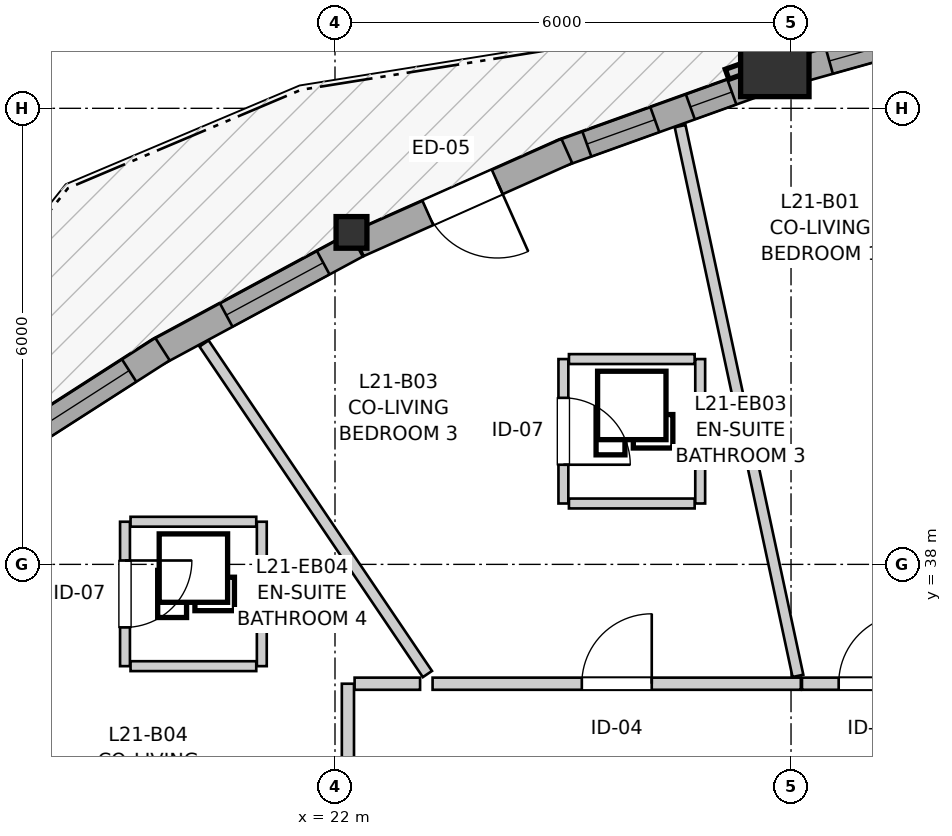
"""IFC4 building model, lengths in metres.
Left out: names, types, materials, properties, quantities, classifications, styles, units other than length and angle.
Written with IfcOpenShell. Run it as: python <this file> out.ifc"""

import sys

from ifc_helpers import new_model, si_unit, direction, frame, frame_2d, origin, origin_2d, place, context, subcontext, project, spatial, rectangle, i_section, extrude, source, transform, mapped, element, fill, save


model = new_model("IFC4")
c1 = context("Model", 3, precision=1e-05, world=origin(), true_north=direction((0.0, 1.0)))
c2 = subcontext(c1, "Body", "Model", "MODEL_VIEW")
j1 = project(units=[si_unit("LENGTHUNIT", "METRE"), si_unit("PLANEANGLEUNIT", "RADIAN")], contexts=[c1])
p1 = place(None, origin())
s1 = spatial("IfcSite", under=j1, at=p1, CompositionType="ELEMENT")
p2 = place(p1, origin())
s2 = spatial("IfcBuilding", under=s1, at=p2, CompositionType="ELEMENT")
p3 = place(p2, frame((0.0, 0.0, 73.6)))
s3 = spatial("IfcBuildingStorey", under=s2, at=p3, CompositionType="ELEMENT", Elevation=73.6)
m1 = source(origin(), c2, "Body", "SweptSolid", [
    extrude(rectangle(XDim=0.9, YDim=0.9, at=origin_2d()), origin(), (0.0, 0.0, 1.0), 2.95),
])
p4 = place(p3, frame((27.787, 44.604, 0.0), z_axis=(0.0, 0.0, 1.0), x_axis=(1.0, 0.0, 0.0)))
e1 = element("IfcColumn", 1, at=p4, inside=s3, PredefinedType="COLUMN", context=c2, shape_type="MappedRepresentation", body=[
    mapped(m1, transform((0.0, 0.0, 0.0), x_axis=(1.0, 0.0, 0.0), y_axis=(0.0, 1.0, 0.0), z_axis=(0.0, 0.0, 1.0), scale=1.0)),
])
m2 = source(origin(), c2, "Body", "SweptSolid", [
    extrude(i_section(OverallWidth=0.406, OverallDepth=0.416, WebThickness=0.027, FlangeThickness=0.044, FilletRadius=0.015, at=origin_2d()), origin(), (0.0, 0.0, 1.0), 2.95),
])
p5 = place(p3, frame((22.217, 42.367, 0.0), z_axis=(0.0, 0.0, 1.0), x_axis=(1.0, 0.0, 0.0)))
e2 = element("IfcColumn", 2, at=p5, inside=s3, PredefinedType="PILASTER", context=c2, shape_type="MappedRepresentation", body=[
    mapped(m2, transform((0.0, 0.0, 0.0), x_axis=(1.0, 0.0, 0.0), y_axis=(0.0, 1.0, 0.0), z_axis=(0.0, 0.0, 1.0), scale=1.0)),
])
p6 = place(p3, frame((30.827, 45.272, 0.0), z_axis=(0.0, 0.0, 1.0), x_axis=(-0.963061576901, -0.269281263918, 0.0)))
e3 = element("IfcWall", 3, at=p6, inside=s3, PredefinedType="SOLIDWALL", context=c2, shape_type="SweptSolid", body=[
    extrude(rectangle(XDim=2.883, YDim=0.35, at=frame_2d((1.441, 0.0))), origin(), (0.0, 0.0, 1.0), 2.48),
])
p7 = place(p6, frame((1.163, 0.0, 0.82)))
e4 = element("IfcOpeningElement", 4, at=p7, cuts=e3, PredefinedType="OPENING", context=c2, shape_type="SweptSolid", body=[
    extrude(rectangle(XDim=1.25, YDim=1.35, at=frame_2d((0.625, 0.675))), frame((0.0, 0.185, 0.0), z_axis=(0.0, -1.0, 0.0), x_axis=(1.0, 0.0, 0.0)), (0.0, 0.0, 1.0), 0.37),
])
p8 = place(p3, frame((27.634, 44.363, 0.0), z_axis=(0.0, 0.0, 1.0), x_axis=(-0.941122275829, -0.3380663573, 0.0)))
e5 = element("IfcWall", 5, at=p8, inside=s3, PredefinedType="SOLIDWALL", context=c2, shape_type="SweptSolid", body=[
    extrude(rectangle(XDim=2.833, YDim=0.35, at=frame_2d((1.417, 0.0))), origin(), (0.0, 0.0, 1.0), 2.48),
])
p9 = place(p8, frame((0.439, 0.0, 0.82)))
e6 = element("IfcOpeningElement", 6, at=p9, cuts=e5, PredefinedType="OPENING", context=c2, shape_type="SweptSolid", body=[
    extrude(rectangle(XDim=0.58, YDim=1.35, at=frame_2d((0.29, 0.675))), frame((0.0, 0.185, 0.0), z_axis=(0.0, -1.0, 0.0), x_axis=(1.0, 0.0, 0.0)), (0.0, 0.0, 1.0), 0.37),
])
p10 = place(p8, frame((1.515, 0.0, 0.82)))
e7 = element("IfcOpeningElement", 7, at=p10, cuts=e5, PredefinedType="OPENING", context=c2, shape_type="SweptSolid", body=[
    extrude(rectangle(XDim=0.95, YDim=1.35, at=frame_2d((0.475, 0.675))), frame((0.0, 0.185, 0.0), z_axis=(0.0, -1.0, 0.0), x_axis=(1.0, 0.0, 0.0)), (0.0, 0.0, 1.0), 0.37),
])
p11 = place(p3, frame((25.051, 43.438, 0.0), z_axis=(0.0, 0.0, 1.0), x_axis=(-0.913435824308, -0.406982794318, 0.0)))
e8 = element("IfcWall", 8, at=p11, inside=s3, PredefinedType="SOLIDWALL", context=c2, shape_type="SweptSolid", body=[
    extrude(rectangle(XDim=3.004, YDim=0.35, at=frame_2d((1.502, 0.0))), origin(), (0.0, 0.0, 1.0), 2.48),
])
p12 = place(p11, frame((1.002, 0.0, 0.0)))
e9 = element("IfcOpeningElement", 9, at=p12, cuts=e8, PredefinedType="OPENING", context=c2, shape_type="SweptSolid", body=[
    extrude(rectangle(XDim=1.0, YDim=2.1, at=frame_2d((0.5, 1.05))), frame((0.0, 0.185, 0.0), z_axis=(0.0, -1.0, 0.0), x_axis=(1.0, 0.0, 0.0)), (0.0, 0.0, 1.0), 0.37),
])
p13 = place(p3, frame((22.282, 42.204, 0.0), z_axis=(0.0, 0.0, 1.0), x_axis=(-0.880100783756, -0.474786910553, 0.0)))
e10 = element("IfcWall", 10, at=p13, inside=s3, PredefinedType="SOLIDWALL", context=c2, shape_type="SweptSolid", body=[
    extrude(rectangle(XDim=2.987, YDim=0.35, at=frame_2d((1.494, 0.0))), origin(), (0.0, 0.0, 1.0), 2.48),
])
p14 = place(p13, frame((0.497, 0.0, 0.82)))
e11 = element("IfcOpeningElement", 11, at=p14, cuts=e10, PredefinedType="OPENING", context=c2, shape_type="SweptSolid", body=[
    extrude(rectangle(XDim=1.45, YDim=1.25, at=frame_2d((0.725, 0.625))), frame((0.0, 0.185, 0.0), z_axis=(0.0, -1.0, 0.0), x_axis=(1.0, 0.0, 0.0)), (0.0, 0.0, 1.0), 0.37),
])
p15 = place(p3, frame((19.73, 40.831, 0.0), z_axis=(0.0, 0.0, 1.0), x_axis=(-0.841577423868, -0.540136500929, 0.0)))
e12 = element("IfcWall", 12, at=p15, inside=s3, PredefinedType="SOLIDWALL", context=c2, shape_type="SweptSolid", body=[
    extrude(rectangle(XDim=2.782, YDim=0.35, at=frame_2d((1.391, 0.0))), origin(), (0.0, 0.0, 1.0), 2.48),
])
p16 = place(p15, frame((0.521, 0.0, 0.82)))
e13 = element("IfcOpeningElement", 13, at=p16, cuts=e12, PredefinedType="OPENING", context=c2, shape_type="SweptSolid", body=[
    extrude(rectangle(XDim=1.75, YDim=1.3, at=frame_2d((0.875, 0.65))), frame((0.0, 0.185, 0.0), z_axis=(0.0, -1.0, 0.0), x_axis=(1.0, 0.0, 0.0)), (0.0, 0.0, 1.0), 0.37),
])
p17 = place(p3, frame((23.284, 36.43, 0.0), z_axis=(0.0, 0.0, 1.0), x_axis=(1.0, 0.0, 0.0)))
e14 = element("IfcWall", 14, at=p17, inside=s3, PredefinedType="PARTITIONING", context=c2, shape_type="SweptSolid", body=[
    extrude(rectangle(XDim=4.845, YDim=0.16, at=frame_2d((2.422, 0.0))), origin(), (0.0, 0.0, 1.0), 2.588),
])
p18 = place(p17, frame((1.963, 0.0, 0.0)))
e15 = element("IfcOpeningElement", 15, at=p18, cuts=e14, PredefinedType="OPENING", context=c2, shape_type="SweptSolid", body=[
    extrude(rectangle(XDim=0.92, YDim=2.1, at=frame_2d((0.46, 1.05))), frame((0.0, 0.09, 0.0), z_axis=(0.0, -1.0, 0.0), x_axis=(1.0, 0.0, 0.0)), (0.0, 0.0, 1.0), 0.18),
])
p19 = place(p3, frame((22.17, 31.61, 0.0), z_axis=(0.0, 0.0, 1.0), x_axis=(0.0, 1.0, 0.0)))
e16 = element("IfcWall", 16, at=p19, inside=s3, PredefinedType="PARTITIONING", context=c2, shape_type="SweptSolid", body=[
    extrude(rectangle(XDim=4.82, YDim=0.16, at=frame_2d((2.41, 0.0))), origin(), (0.0, 0.0, 1.0), 2.95),
])
p20 = place(p19, frame((1.959, 0.0, 0.0)))
e17 = element("IfcOpeningElement", 17, at=p20, cuts=e16, PredefinedType="OPENING", context=c2, shape_type="SweptSolid", body=[
    extrude(rectangle(XDim=0.92, YDim=2.1, at=frame_2d((0.46, 1.05))), frame((0.0, 0.09, 0.0), z_axis=(0.0, -1.0, 0.0), x_axis=(1.0, 0.0, 0.0)), (0.0, 0.0, 1.0), 0.18),
])
p21 = place(p3, frame((28.144, 36.43, 0.0), z_axis=(0.0, 0.0, 1.0), x_axis=(1.0, 0.0, 0.0)))
e18 = element("IfcWall", 18, at=p21, inside=s3, PredefinedType="PARTITIONING", context=c2, shape_type="SweptSolid", body=[
    extrude(rectangle(XDim=1.932, YDim=0.16, at=frame_2d((0.966, 0.0))), origin(), (0.0, 0.0, 1.0), 2.95),
])
p22 = place(p21, frame((0.483, 0.0, 0.0)))
e19 = element("IfcOpeningElement", 19, at=p22, cuts=e18, PredefinedType="OPENING", context=c2, shape_type="SweptSolid", body=[
    extrude(rectangle(XDim=0.92, YDim=2.1, at=frame_2d((0.46, 1.05))), frame((0.0, 0.09, 0.0), z_axis=(0.0, -1.0, 0.0), x_axis=(1.0, 0.0, 0.0)), (0.0, 0.0, 1.0), 0.18),
])
p23 = place(p3, frame((25.005, 40.701, 0.0), z_axis=(0.0, 0.0, 1.0), x_axis=(0.0, -1.0, 0.0)))
e20 = element("IfcWall", 20, at=p23, inside=s3, PredefinedType="PARTITIONING", context=c2, shape_type="SweptSolid", body=[
    extrude(rectangle(XDim=1.9, YDim=0.13, at=frame_2d((0.95, 0.0))), origin(), (0.0, 0.0, 1.0), 2.95),
])
p24 = place(p23, frame((0.51, 0.0, 0.0)))
e21 = element("IfcOpeningElement", 21, at=p24, cuts=e20, PredefinedType="OPENING", context=c2, shape_type="SweptSolid", body=[
    extrude(rectangle(XDim=0.88, YDim=2.05, at=frame_2d((0.44, 1.025))), frame((0.0, 0.075, 0.0), z_axis=(0.0, -1.0, 0.0), x_axis=(1.0, 0.0, 0.0)), (0.0, 0.0, 1.0), 0.15),
])
p25 = place(p3, frame((19.237, 38.561, 0.0), z_axis=(0.0, 0.0, 1.0), x_axis=(0.0, -1.0, 0.0)))
e22 = element("IfcWall", 22, at=p25, inside=s3, PredefinedType="PARTITIONING", context=c2, shape_type="SweptSolid", body=[
    extrude(rectangle(XDim=1.9, YDim=0.13, at=frame_2d((0.95, 0.0))), origin(), (0.0, 0.0, 1.0), 2.95),
])
p26 = place(p25, frame((0.51, 0.0, 0.0)))
e23 = element("IfcOpeningElement", 23, at=p26, cuts=e22, PredefinedType="OPENING", context=c2, shape_type="SweptSolid", body=[
    extrude(rectangle(XDim=0.88, YDim=2.05, at=frame_2d((0.44, 1.025))), frame((0.0, 0.075, 0.0), z_axis=(0.0, -1.0, 0.0), x_axis=(1.0, 0.0, 0.0)), (0.0, 0.0, 1.0), 0.15),
])
p27 = place(p3, frame((14.527, 36.886, 0.0), z_axis=(0.0, 0.0, 1.0), x_axis=(0.823849772282, -0.566808215106, 0.0)))
e24 = element("IfcWall", 24, at=p27, inside=s3, PredefinedType="PARTITIONING", context=c2, shape_type="SweptSolid", body=[
    extrude(rectangle(XDim=9.122, YDim=0.145, at=frame_2d((4.561, 0.0))), origin(), (0.0, 0.0, 1.0), 2.95),
])
p28 = place(p3, frame((26.541, 43.766, 0.0), z_axis=(0.0, 0.0, 1.0), x_axis=(0.209522326513, -0.9778038631, 0.0)))
e25 = element("IfcWall", 25, at=p28, inside=s3, PredefinedType="PARTITIONING", context=c2, shape_type="SweptSolid", body=[
    extrude(rectangle(XDim=7.397, YDim=0.145, at=frame_2d((3.698, 0.0))), origin(), (0.0, 0.0, 1.0), 2.95),
])
p29 = place(p3, frame((20.277, 40.906, 0.0), z_axis=(0.0, 0.0, 1.0), x_axis=(0.559905741259, -0.828556311246, 0.0)))
e26 = element("IfcWall", 26, at=p29, inside=s3, PredefinedType="PARTITIONING", context=c2, shape_type="SweptSolid", body=[
    extrude(rectangle(XDim=5.249, YDim=0.145, at=frame_2d((2.625, 0.0))), origin(), (0.0, 0.0, 1.0), 2.95),
])
p30 = place(p3, frame((26.805, 38.801, 0.0), z_axis=(0.0, 0.0, 1.0), x_axis=(0.0, 1.0, 0.0)))
e27 = element("IfcWall", 27, at=p30, inside=s3, PredefinedType="PARTITIONING", context=c2, shape_type="SweptSolid", body=[
    extrude(rectangle(XDim=1.9, YDim=0.13, at=frame_2d((0.95, 0.0))), origin(), (0.0, 0.0, 1.0), 2.95),
])
p31 = place(p3, frame((21.037, 36.661, 0.0), z_axis=(0.0, 0.0, 1.0), x_axis=(0.0, 1.0, 0.0)))
e28 = element("IfcWall", 28, at=p31, inside=s3, PredefinedType="PARTITIONING", context=c2, shape_type="SweptSolid", body=[
    extrude(rectangle(XDim=1.9, YDim=0.13, at=frame_2d((0.95, 0.0))), origin(), (0.0, 0.0, 1.0), 2.95),
])
p32 = place(p3, frame((25.078, 40.701, 0.0), z_axis=(0.0, 0.0, 1.0), x_axis=(1.0, 0.0, 0.0)))
e29 = element("IfcWall", 29, at=p32, inside=s3, PredefinedType="PARTITIONING", context=c2, shape_type="SweptSolid", body=[
    extrude(rectangle(XDim=1.654, YDim=0.13, at=frame_2d((0.827, 0.0))), origin(), (0.0, 0.0, 1.0), 2.558),
])
for number, where, z_axis, x_axis in (
    (30, (25.078, 38.801, 0.0), (0.0, 0.0, 1.0), (1.0, 0.0, 0.0)),
    (31, (19.31, 38.561, 0.0), (0.0, 0.0, 1.0), (1.0, 0.0, 0.0)),
    (32, (19.31, 36.661, 0.0), (0.0, 0.0, 1.0), (1.0, 0.0, 0.0)),
):
    element("IfcWall", number, at=place(p3, frame(where, z_axis=z_axis, x_axis=x_axis)), inside=s3, PredefinedType="PARTITIONING", context=c2, shape_type="SweptSolid", body=[
        extrude(rectangle(XDim=1.654, YDim=0.13, at=frame_2d((0.827, 0.0))), origin(), (0.0, 0.0, 1.0), 2.95),
    ])
p33 = place(p3, frame((22.258, 36.43, 0.0), z_axis=(0.0, 0.0, 1.0), x_axis=(1.0, 0.0, 0.0)))
e33 = element("IfcWall", 33, at=p33, inside=s3, PredefinedType="PARTITIONING", context=c2, shape_type="SweptSolid", body=[
    extrude(rectangle(XDim=0.861, YDim=0.16, at=frame_2d((0.431, 0.0))), origin(), (0.0, 0.0, 1.0), 2.95),
])
m3 = source(origin(), c2, "Body", "SweptSolid", [
    extrude(rectangle(XDim=1.25, YDim=1.35, at=frame_2d((0.625, 0.675))), frame((0.0, 0.03, 0.0), z_axis=(0.0, -1.0, 0.0), x_axis=(1.0, 0.0, 0.0)), (0.0, 0.0, 1.0), 0.06),
])
p34 = place(p7, origin())
e34 = element("IfcWindow", 34, at=p34, inside=s3, PartitioningType="SINGLE_PANEL", PredefinedType="WINDOW", context=c2, shape_type="MappedRepresentation", body=[
    mapped(m3, transform((0.0, 0.0, 0.0), x_axis=(1.0, 0.0, 0.0), y_axis=(0.0, 1.0, 0.0), z_axis=(0.0, 0.0, 1.0), scale=1.0)),
])
fill(e4, e34)
m4 = source(origin(), c2, "Body", "SweptSolid", [
    extrude(rectangle(XDim=0.58, YDim=1.35, at=frame_2d((0.29, 0.675))), frame((0.0, 0.03, 0.0), z_axis=(0.0, -1.0, 0.0), x_axis=(1.0, 0.0, 0.0)), (0.0, 0.0, 1.0), 0.06),
])
p35 = place(p9, origin())
e35 = element("IfcWindow", 35, at=p35, inside=s3, PartitioningType="SINGLE_PANEL", PredefinedType="WINDOW", context=c2, shape_type="MappedRepresentation", body=[
    mapped(m4, transform((0.0, 0.0, 0.0), x_axis=(1.0, 0.0, 0.0), y_axis=(0.0, 1.0, 0.0), z_axis=(0.0, 0.0, 1.0), scale=1.0)),
])
fill(e6, e35)
m5 = source(origin(), c2, "Body", "SweptSolid", [
    extrude(rectangle(XDim=0.95, YDim=1.35, at=frame_2d((0.475, 0.675))), frame((0.0, 0.03, 0.0), z_axis=(0.0, -1.0, 0.0), x_axis=(1.0, 0.0, 0.0)), (0.0, 0.0, 1.0), 0.06),
])
p36 = place(p10, origin())
e36 = element("IfcWindow", 36, at=p36, inside=s3, PartitioningType="SINGLE_PANEL", PredefinedType="WINDOW", context=c2, shape_type="MappedRepresentation", body=[
    mapped(m5, transform((0.0, 0.0, 0.0), x_axis=(1.0, 0.0, 0.0), y_axis=(0.0, 1.0, 0.0), z_axis=(0.0, 0.0, 1.0), scale=1.0)),
])
fill(e7, e36)
m6 = source(origin(), c2, "Body", "SweptSolid", [
    extrude(rectangle(XDim=1.45, YDim=1.25, at=frame_2d((0.725, 0.625))), frame((0.0, 0.03, 0.0), z_axis=(0.0, -1.0, 0.0), x_axis=(1.0, 0.0, 0.0)), (0.0, 0.0, 1.0), 0.06),
])
p37 = place(p14, origin())
e37 = element("IfcWindow", 37, at=p37, inside=s3, PartitioningType="SINGLE_PANEL", PredefinedType="WINDOW", context=c2, shape_type="MappedRepresentation", body=[
    mapped(m6, transform((0.0, 0.0, 0.0), x_axis=(1.0, 0.0, 0.0), y_axis=(0.0, 1.0, 0.0), z_axis=(0.0, 0.0, 1.0), scale=1.0)),
])
fill(e11, e37)
m7 = source(origin(), c2, "Body", "SweptSolid", [
    extrude(rectangle(XDim=1.75, YDim=1.3, at=frame_2d((0.875, 0.65))), frame((0.0, 0.03, 0.0), z_axis=(0.0, -1.0, 0.0), x_axis=(1.0, 0.0, 0.0)), (0.0, 0.0, 1.0), 0.06),
])
p38 = place(p16, origin())
e38 = element("IfcWindow", 38, at=p38, inside=s3, PartitioningType="SINGLE_PANEL", PredefinedType="WINDOW", context=c2, shape_type="MappedRepresentation", body=[
    mapped(m7, transform((0.0, 0.0, 0.0), x_axis=(1.0, 0.0, 0.0), y_axis=(0.0, 1.0, 0.0), z_axis=(0.0, 0.0, 1.0), scale=1.0)),
])
fill(e13, e38)
m8 = source(origin(), c2, "Body", "SweptSolid", [
    extrude(rectangle(XDim=1.0, YDim=2.1, at=frame_2d((0.5, 1.05))), frame((0.0, 0.025, 0.0), z_axis=(0.0, -1.0, 0.0), x_axis=(1.0, 0.0, 0.0)), (0.0, 0.0, 1.0), 0.05),
])
p39 = place(p12, origin())
e39 = element("IfcDoor", 39, at=p39, inside=s3, OperationType="SINGLE_SWING_LEFT", PredefinedType="DOOR", context=c2, shape_type="MappedRepresentation", body=[
    mapped(m8, transform((0.0, 0.0, 0.0), x_axis=(1.0, 0.0, 0.0), y_axis=(0.0, 1.0, 0.0), z_axis=(0.0, 0.0, 1.0), scale=1.0)),
])
fill(e9, e39)
m9 = source(origin(), c2, "Body", "SweptSolid", [
    extrude(rectangle(XDim=0.92, YDim=2.1, at=frame_2d((0.46, 1.05))), frame((0.0, 0.025, 0.0), z_axis=(0.0, -1.0, 0.0), x_axis=(1.0, 0.0, 0.0)), (0.0, 0.0, 1.0), 0.05),
])
p40 = place(p18, origin())
e40 = element("IfcDoor", 40, at=p40, inside=s3, OperationType="SINGLE_SWING_RIGHT", PredefinedType="DOOR", context=c2, shape_type="MappedRepresentation", body=[
    mapped(m9, transform((0.0, 0.0, 0.0), x_axis=(1.0, 0.0, 0.0), y_axis=(0.0, 1.0, 0.0), z_axis=(0.0, 0.0, 1.0), scale=1.0)),
])
fill(e15, e40)
p41 = place(p22, origin())
e41 = element("IfcDoor", 41, at=p41, inside=s3, OperationType="SINGLE_SWING_RIGHT", PredefinedType="DOOR", context=c2, shape_type="MappedRepresentation", body=[
    mapped(m9, transform((0.0, 0.0, 0.0), x_axis=(1.0, 0.0, 0.0), y_axis=(0.0, 1.0, 0.0), z_axis=(0.0, 0.0, 1.0), scale=1.0)),
])
fill(e19, e41)
m10 = source(origin(), c2, "Body", "SweptSolid", [
    extrude(rectangle(XDim=0.88, YDim=2.05, at=frame_2d((0.44, 1.025))), frame((0.0, 0.025, 0.0), z_axis=(0.0, -1.0, 0.0), x_axis=(1.0, 0.0, 0.0)), (0.0, 0.0, 1.0), 0.05),
])
p42 = place(p24, origin())
e42 = element("IfcDoor", 42, at=p42, inside=s3, OperationType="SINGLE_SWING_RIGHT", PredefinedType="DOOR", context=c2, shape_type="MappedRepresentation", body=[
    mapped(m10, transform((0.0, 0.0, 0.0), x_axis=(1.0, 0.0, 0.0), y_axis=(0.0, 1.0, 0.0), z_axis=(0.0, 0.0, 1.0), scale=1.0)),
])
fill(e21, e42)
p43 = place(p26, origin())
e43 = element("IfcDoor", 43, at=p43, inside=s3, OperationType="SINGLE_SWING_LEFT", PredefinedType="DOOR", context=c2, shape_type="MappedRepresentation", body=[
    mapped(m10, transform((0.0, 0.0, 0.0), x_axis=(1.0, 0.0, 0.0), y_axis=(0.0, 1.0, 0.0), z_axis=(0.0, 0.0, 1.0), scale=1.0)),
])
fill(e23, e43)
save(model, sys.argv[1])
